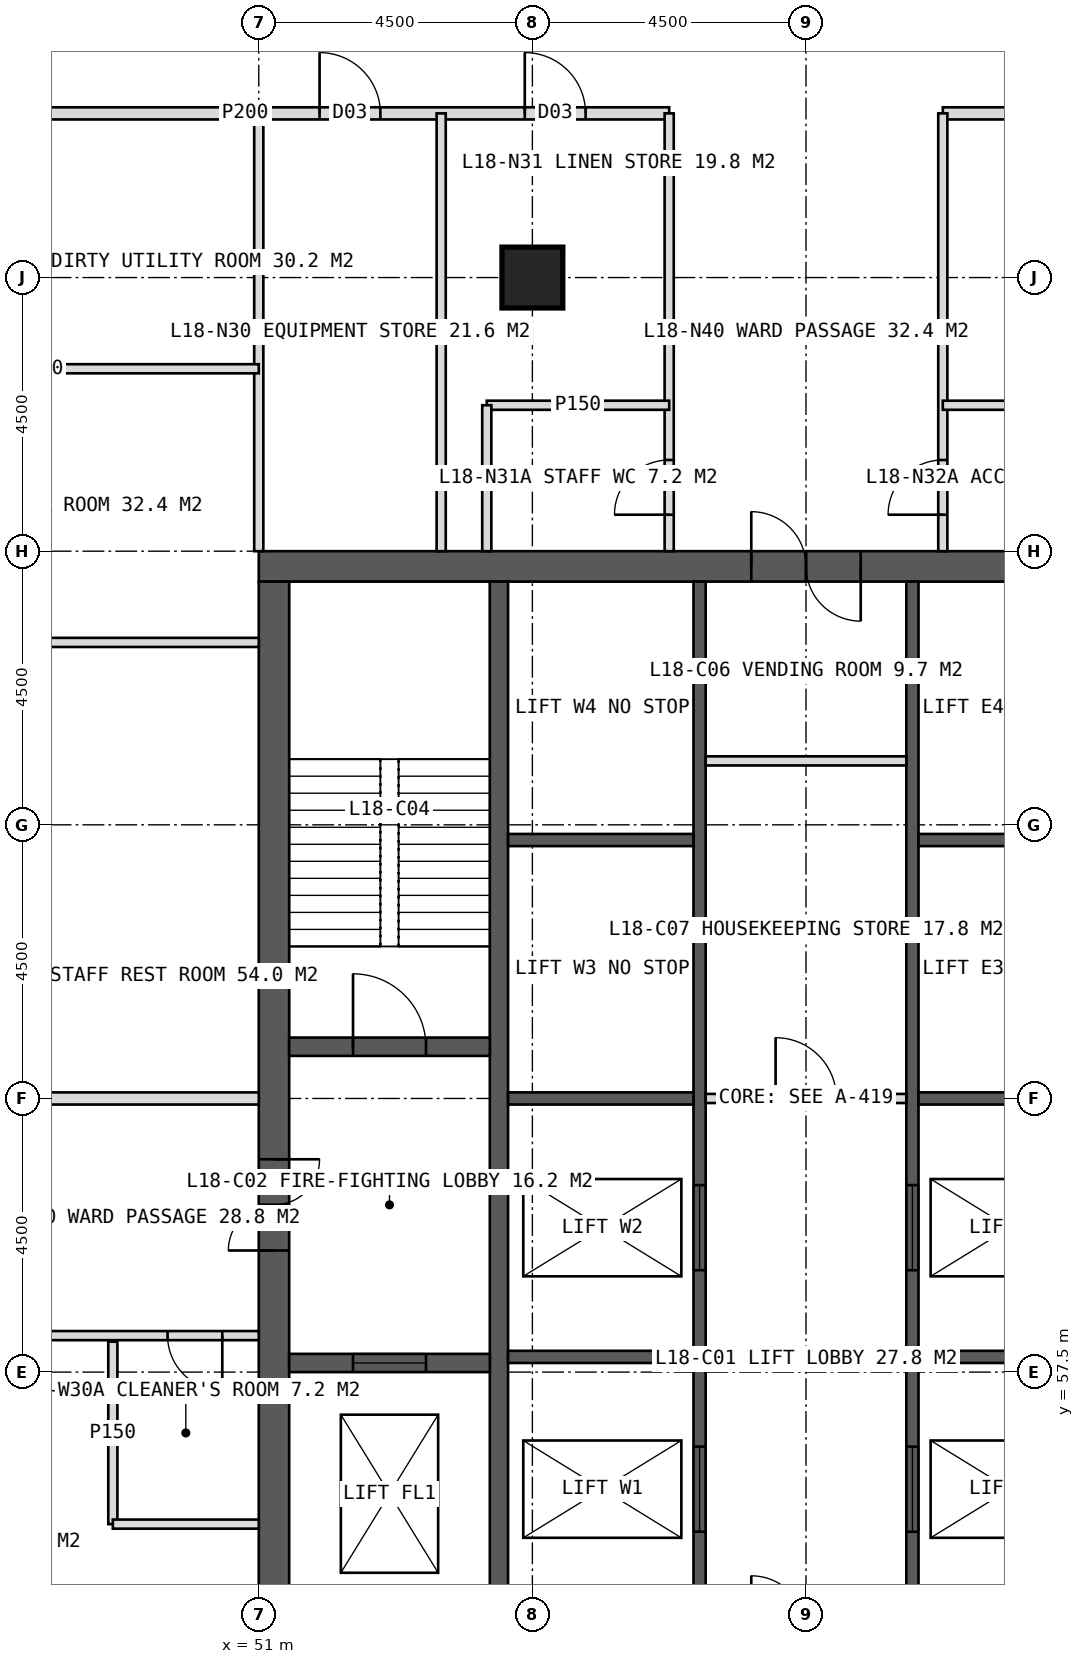
"""IFC4 building model, lengths in metres.
Left out: names, types, materials, properties, quantities, classifications, styles, units other than length and angle.
Written with IfcOpenShell. Run it as: python <this file> out.ifc"""

import sys

from ifc_helpers import new_model, si_unit, direction, frame, frame_2d, origin, origin_2d, place, context, subcontext, project, spatial, rectangle, hollow_rectangle, extrude, element, fill, save


model = new_model("IFC4")
c1 = context("Model", 3, precision=1e-05, world=origin(), true_north=direction((0.0, 1.0)))
c2 = subcontext(c1, "Body", "Model", "MODEL_VIEW")
j1 = project(units=[si_unit("LENGTHUNIT", "METRE"), si_unit("PLANEANGLEUNIT", "RADIAN")], contexts=[c1])
p1 = place(None, origin())
s1 = spatial("IfcSite", under=j1, at=p1, CompositionType="ELEMENT")
p2 = place(p1, origin())
s2 = spatial("IfcBuilding", under=s1, at=p2, CompositionType="ELEMENT")
p3 = place(p2, frame((0.0, 0.0, 79.0)))
s3 = spatial("IfcBuildingStorey", under=s2, at=p3, CompositionType="ELEMENT", Elevation=79.0)
p4 = place(p3, frame((51.0, 70.75, 0.0), z_axis=(0.0, 0.0, 1.0), x_axis=(1.0, 0.0, 0.0)))
e1 = element("IfcWall", 1, at=p4, inside=s3, PredefinedType="SHEAR", context=c2, shape_type="SweptSolid", body=[
    extrude(rectangle(XDim=18.0, YDim=0.5, at=frame_2d((9.0, 0.0))), origin(), (0.0, 0.0, 1.0), 4.0),
])
p5 = place(p4, frame((8.1, 0.0, 0.0)))
e2 = element("IfcOpeningElement", 2, at=p5, cuts=e1, PredefinedType="OPENING", context=c2, shape_type="SweptSolid", body=[
    extrude(rectangle(XDim=1.8, YDim=2.2, at=frame_2d((0.9, 1.1))), frame((0.0, 0.26, 0.0), z_axis=(0.0, -1.0, 0.0), x_axis=(1.0, 0.0, 0.0)), (0.0, 0.0, 1.0), 0.52),
])
p6 = place(p3, frame((51.25, 53.5, 0.0), z_axis=(0.0, 0.0, 1.0), x_axis=(0.0, 1.0, 0.0)))
e3 = element("IfcWall", 3, at=p6, inside=s3, PredefinedType="SHEAR", context=c2, shape_type="SweptSolid", body=[
    extrude(rectangle(XDim=17.0, YDim=0.5, at=frame_2d((8.5, 0.0))), origin(), (0.0, 0.0, 1.0), 4.0),
])
p7 = place(p6, frame((6.0, 0.0, 0.0)))
e4 = element("IfcOpeningElement", 4, at=p7, cuts=e3, PredefinedType="OPENING", context=c2, shape_type="SweptSolid", body=[
    extrude(rectangle(XDim=1.5, YDim=2.2, at=frame_2d((0.75, 1.1))), frame((0.0, 0.26, 0.0), z_axis=(0.0, -1.0, 0.0), x_axis=(1.0, 0.0, 0.0)), (0.0, 0.0, 1.0), 0.52),
])
p8 = place(p3, frame((54.95, 53.5, 0.0), z_axis=(0.0, 0.0, 1.0), x_axis=(0.0, 1.0, 0.0)))
e5 = element("IfcWall", 5, at=p8, inside=s3, PredefinedType="SHEAR", context=c2, shape_type="SweptSolid", body=[
    extrude(rectangle(XDim=17.0, YDim=0.3, at=frame_2d((8.5, 0.0))), origin(), (0.0, 0.0, 1.0), 4.0),
])
p9 = place(p3, frame((58.25, 53.5, 0.0), z_axis=(0.0, 0.0, 1.0), x_axis=(0.0, 1.0, 0.0)))
e6 = element("IfcWall", 6, at=p9, inside=s3, PredefinedType="SHEAR", context=c2, shape_type="SweptSolid", body=[
    extrude(rectangle(XDim=17.0, YDim=0.2, at=frame_2d((8.5, 0.0))), origin(), (0.0, 0.0, 1.0), 4.0),
])
p10 = place(p9, frame((1.375, 0.0, 0.0)))
e7 = element("IfcOpeningElement", 7, at=p10, cuts=e6, PredefinedType="OPENING", context=c2, shape_type="SweptSolid", body=[
    extrude(rectangle(XDim=1.4, YDim=2.2, at=frame_2d((0.7, 1.1))), frame((0.0, 0.11, 0.0), z_axis=(0.0, -1.0, 0.0), x_axis=(1.0, 0.0, 0.0)), (0.0, 0.0, 1.0), 0.22),
])
p11 = place(p9, frame((5.675, 0.0, 0.0)))
e8 = element("IfcOpeningElement", 8, at=p11, cuts=e6, PredefinedType="OPENING", context=c2, shape_type="SweptSolid", body=[
    extrude(rectangle(XDim=1.4, YDim=2.2, at=frame_2d((0.7, 1.1))), frame((0.0, 0.11, 0.0), z_axis=(0.0, -1.0, 0.0), x_axis=(1.0, 0.0, 0.0)), (0.0, 0.0, 1.0), 0.22),
])
p12 = place(p3, frame((61.75, 53.5, 0.0), z_axis=(0.0, 0.0, 1.0), x_axis=(0.0, 1.0, 0.0)))
e9 = element("IfcWall", 9, at=p12, inside=s3, PredefinedType="SHEAR", context=c2, shape_type="SweptSolid", body=[
    extrude(rectangle(XDim=17.0, YDim=0.2, at=frame_2d((8.5, 0.0))), origin(), (0.0, 0.0, 1.0), 4.0),
])
p13 = place(p12, frame((1.375, 0.0, 0.0)))
e10 = element("IfcOpeningElement", 10, at=p13, cuts=e9, PredefinedType="OPENING", context=c2, shape_type="SweptSolid", body=[
    extrude(rectangle(XDim=1.4, YDim=2.2, at=frame_2d((0.7, 1.1))), frame((0.0, 0.11, 0.0), z_axis=(0.0, -1.0, 0.0), x_axis=(1.0, 0.0, 0.0)), (0.0, 0.0, 1.0), 0.22),
])
p14 = place(p12, frame((5.675, 0.0, 0.0)))
e11 = element("IfcOpeningElement", 11, at=p14, cuts=e9, PredefinedType="OPENING", context=c2, shape_type="SweptSolid", body=[
    extrude(rectangle(XDim=1.4, YDim=2.2, at=frame_2d((0.7, 1.1))), frame((0.0, 0.11, 0.0), z_axis=(0.0, -1.0, 0.0), x_axis=(1.0, 0.0, 0.0)), (0.0, 0.0, 1.0), 0.22),
])
for number, where, z_axis, x_axis in (
    (12, (55.1, 57.75, 0.0), (0.0, 0.0, 1.0), (1.0, 0.0, 0.0)),
    (13, (61.85, 57.75, 0.0), (0.0, 0.0, 1.0), (1.0, 0.0, 0.0)),
    (14, (55.1, 62.0, 0.0), (0.0, 0.0, 1.0), (1.0, 0.0, 0.0)),
    (15, (61.85, 62.0, 0.0), (0.0, 0.0, 1.0), (1.0, 0.0, 0.0)),
    (16, (55.1, 66.25, 0.0), (0.0, 0.0, 1.0), (1.0, 0.0, 0.0)),
    (17, (61.85, 66.25, 0.0), (0.0, 0.0, 1.0), (1.0, 0.0, 0.0)),
):
    element("IfcWall", number, at=place(p3, frame(where, z_axis=z_axis, x_axis=x_axis)), inside=s3, PredefinedType="SHEAR", context=c2, shape_type="SweptSolid", body=[
        extrude(rectangle(XDim=3.05, YDim=0.2, at=frame_2d((1.525, 0.0))), origin(), (0.0, 0.0, 1.0), 4.0),
    ])
p15 = place(p3, frame((51.5, 62.85, 0.0), z_axis=(0.0, 0.0, 1.0), x_axis=(1.0, 0.0, 0.0)))
e18 = element("IfcWall", 18, at=p15, inside=s3, PredefinedType="SHEAR", context=c2, shape_type="SweptSolid", body=[
    extrude(rectangle(XDim=3.3, YDim=0.3, at=frame_2d((1.65, 0.0))), origin(), (0.0, 0.0, 1.0), 4.0),
])
p16 = place(p15, frame((1.05, 0.0, 0.0)))
e19 = element("IfcOpeningElement", 19, at=p16, cuts=e18, PredefinedType="OPENING", context=c2, shape_type="SweptSolid", body=[
    extrude(rectangle(XDim=1.2, YDim=2.1, at=frame_2d((0.6, 1.05))), frame((0.0, 0.16, 0.0), z_axis=(0.0, -1.0, 0.0), x_axis=(1.0, 0.0, 0.0)), (0.0, 0.0, 1.0), 0.32),
])
p17 = place(p3, frame((51.5, 57.65, 0.0), z_axis=(0.0, 0.0, 1.0), x_axis=(1.0, 0.0, 0.0)))
e20 = element("IfcWall", 20, at=p17, inside=s3, PredefinedType="SHEAR", context=c2, shape_type="SweptSolid", body=[
    extrude(rectangle(XDim=3.3, YDim=0.3, at=frame_2d((1.65, 0.0))), origin(), (0.0, 0.0, 1.0), 4.0),
])
p18 = place(p17, frame((1.05, 0.0, 0.0)))
e21 = element("IfcOpeningElement", 21, at=p18, cuts=e20, PredefinedType="OPENING", context=c2, shape_type="SweptSolid", body=[
    extrude(rectangle(XDim=1.2, YDim=2.2, at=frame_2d((0.6, 1.1))), frame((0.0, 0.16, 0.0), z_axis=(0.0, -1.0, 0.0), x_axis=(1.0, 0.0, 0.0)), (0.0, 0.0, 1.0), 0.32),
])
p19 = place(p3, frame((55.5, 75.5, 0.0), z_axis=(0.0, 0.0, 1.0), x_axis=(1.0, 0.0, 0.0)))
e22 = element("IfcColumn", 22, at=p19, inside=s3, PredefinedType="COLUMN", context=c2, shape_type="SweptSolid", body=[
    extrude(hollow_rectangle(XDim=1.0, YDim=1.0, WallThickness=0.1, at=origin_2d()), origin(), (0.0, 0.0, 1.0), 4.0),
])
p20 = place(p3, frame((51.0, 71.0, 0.0), z_axis=(0.0, 0.0, 1.0), x_axis=(0.0, 1.0, 0.0)))
e23 = element("IfcWall", 23, at=p20, inside=s3, PredefinedType="PARTITIONING", context=c2, shape_type="SweptSolid", body=[
    extrude(rectangle(XDim=7.2, YDim=0.15, at=frame_2d((3.6, 0.0))), origin(), (0.0, 0.0, 1.0), 3.75),
])
p21 = place(p3, frame((43.8, 78.2, 0.0), z_axis=(0.0, 0.0, 1.0), x_axis=(1.0, 0.0, 0.0)))
e24 = element("IfcWall", 24, at=p21, inside=s3, PredefinedType="PARTITIONING", context=c2, shape_type="SweptSolid", body=[
    extrude(rectangle(XDim=13.95, YDim=0.2, at=frame_2d((6.975, 0.0))), origin(), (0.0, 0.0, 1.0), 3.75),
])
p22 = place(p21, frame((8.2, 0.0, 0.0)))
e25 = element("IfcOpeningElement", 25, at=p22, cuts=e24, PredefinedType="OPENING", context=c2, shape_type="SweptSolid", body=[
    extrude(rectangle(XDim=1.0, YDim=2.1, at=frame_2d((0.5, 1.05))), frame((0.0, 0.11, 0.0), z_axis=(0.0, -1.0, 0.0), x_axis=(1.0, 0.0, 0.0)), (0.0, 0.0, 1.0), 0.22),
])
p23 = place(p21, frame((11.575, 0.0, 0.0)))
e26 = element("IfcOpeningElement", 26, at=p23, cuts=e24, PredefinedType="OPENING", context=c2, shape_type="SweptSolid", body=[
    extrude(rectangle(XDim=1.0, YDim=2.1, at=frame_2d((0.5, 1.05))), frame((0.0, 0.11, 0.0), z_axis=(0.0, -1.0, 0.0), x_axis=(1.0, 0.0, 0.0)), (0.0, 0.0, 1.0), 0.22),
])
p24 = place(p3, frame((62.25, 78.2, 0.0), z_axis=(0.0, 0.0, 1.0), x_axis=(1.0, 0.0, 0.0)))
e27 = element("IfcWall", 27, at=p24, inside=s3, PredefinedType="PARTITIONING", context=c2, shape_type="SweptSolid", body=[
    extrude(rectangle(XDim=6.75, YDim=0.2, at=frame_2d((3.375, 0.0))), origin(), (0.0, 0.0, 1.0), 3.75),
])
p25 = place(p24, frame((2.125, 0.0, 0.0)))
e28 = element("IfcOpeningElement", 28, at=p25, cuts=e27, PredefinedType="OPENING", context=c2, shape_type="SweptSolid", body=[
    extrude(rectangle(XDim=1.0, YDim=2.1, at=frame_2d((0.5, 1.05))), frame((0.0, 0.11, 0.0), z_axis=(0.0, -1.0, 0.0), x_axis=(1.0, 0.0, 0.0)), (0.0, 0.0, 1.0), 0.22),
])
p26 = place(p24, frame((5.5, 0.0, 0.0)))
e29 = element("IfcOpeningElement", 29, at=p26, cuts=e27, PredefinedType="OPENING", context=c2, shape_type="SweptSolid", body=[
    extrude(rectangle(XDim=1.0, YDim=2.1, at=frame_2d((0.5, 1.05))), frame((0.0, 0.11, 0.0), z_axis=(0.0, -1.0, 0.0), x_axis=(1.0, 0.0, 0.0)), (0.0, 0.0, 1.0), 0.22),
])
p27 = place(p3, frame((57.75, 71.0, 0.0), z_axis=(0.0, 0.0, 1.0), x_axis=(0.0, 1.0, 0.0)))
e30 = element("IfcWall", 30, at=p27, inside=s3, PredefinedType="PARTITIONING", context=c2, shape_type="SweptSolid", body=[
    extrude(rectangle(XDim=7.2, YDim=0.15, at=frame_2d((3.6, 0.0))), origin(), (0.0, 0.0, 1.0), 3.75),
])
p28 = place(p27, frame((0.6, 0.0, 0.0)))
e31 = element("IfcOpeningElement", 31, at=p28, cuts=e30, PredefinedType="OPENING", context=c2, shape_type="SweptSolid", body=[
    extrude(rectangle(XDim=0.9, YDim=2.1, at=frame_2d((0.45, 1.05))), frame((0.0, 0.085, 0.0), z_axis=(0.0, -1.0, 0.0), x_axis=(1.0, 0.0, 0.0)), (0.0, 0.0, 1.0), 0.17),
])
p29 = place(p3, frame((62.25, 71.0, 0.0), z_axis=(0.0, 0.0, 1.0), x_axis=(0.0, 1.0, 0.0)))
e32 = element("IfcWall", 32, at=p29, inside=s3, PredefinedType="PARTITIONING", context=c2, shape_type="SweptSolid", body=[
    extrude(rectangle(XDim=7.2, YDim=0.15, at=frame_2d((3.6, 0.0))), origin(), (0.0, 0.0, 1.0), 3.75),
])
p30 = place(p29, frame((0.6, 0.0, 0.0)))
e33 = element("IfcOpeningElement", 33, at=p30, cuts=e32, PredefinedType="OPENING", context=c2, shape_type="SweptSolid", body=[
    extrude(rectangle(XDim=0.9, YDim=2.1, at=frame_2d((0.45, 1.05))), frame((0.0, 0.085, 0.0), z_axis=(0.0, -1.0, 0.0), x_axis=(1.0, 0.0, 0.0)), (0.0, 0.0, 1.0), 0.17),
])
p31 = place(p3, frame((54.0, 71.0, 0.0), z_axis=(0.0, 0.0, 1.0), x_axis=(0.0, 1.0, 0.0)))
e34 = element("IfcWall", 34, at=p31, inside=s3, PredefinedType="PARTITIONING", context=c2, shape_type="SweptSolid", body=[
    extrude(rectangle(XDim=7.2, YDim=0.15, at=frame_2d((3.6, 0.0))), origin(), (0.0, 0.0, 1.0), 3.75),
])
p32 = place(p3, frame((54.75, 73.4, 0.0), z_axis=(0.0, 0.0, 1.0), x_axis=(1.0, 0.0, 0.0)))
e35 = element("IfcWall", 35, at=p32, inside=s3, PredefinedType="PARTITIONING", context=c2, shape_type="SweptSolid", body=[
    extrude(rectangle(XDim=3.0, YDim=0.15, at=frame_2d((1.5, 0.0))), origin(), (0.0, 0.0, 1.0), 3.75),
])
p33 = place(p3, frame((54.75, 71.0, 0.0), z_axis=(0.0, 0.0, 1.0), x_axis=(0.0, 1.0, 0.0)))
e36 = element("IfcWall", 36, at=p33, inside=s3, PredefinedType="PARTITIONING", context=c2, shape_type="SweptSolid", body=[
    extrude(rectangle(XDim=2.4, YDim=0.15, at=frame_2d((1.2, 0.0))), origin(), (0.0, 0.0, 1.0), 3.75),
])
p34 = place(p3, frame((62.25, 73.4, 0.0), z_axis=(0.0, 0.0, 1.0), x_axis=(1.0, 0.0, 0.0)))
e37 = element("IfcWall", 37, at=p34, inside=s3, PredefinedType="PARTITIONING", context=c2, shape_type="SweptSolid", body=[
    extrude(rectangle(XDim=3.0, YDim=0.15, at=frame_2d((1.5, 0.0))), origin(), (0.0, 0.0, 1.0), 3.75),
])
p35 = place(p3, frame((51.0, 58.1, 0.0), z_axis=(0.0, 0.0, 1.0), x_axis=(-1.0, 0.0, 0.0)))
e38 = element("IfcWall", 38, at=p35, inside=s3, PredefinedType="PARTITIONING", context=c2, shape_type="SweptSolid", body=[
    extrude(rectangle(XDim=7.2, YDim=0.15, at=frame_2d((3.6, 0.0))), origin(), (0.0, 0.0, 1.0), 3.75),
])
p36 = place(p35, frame((0.6, 0.0, 0.0)))
e39 = element("IfcOpeningElement", 39, at=p36, cuts=e38, PredefinedType="OPENING", context=c2, shape_type="SweptSolid", body=[
    extrude(rectangle(XDim=0.9, YDim=2.1, at=frame_2d((0.45, 1.05))), frame((0.0, 0.085, 0.0), z_axis=(0.0, -1.0, 0.0), x_axis=(1.0, 0.0, 0.0)), (0.0, 0.0, 1.0), 0.17),
])
p37 = place(p3, frame((51.0, 62.0, 0.0), z_axis=(0.0, 0.0, 1.0), x_axis=(-1.0, 0.0, 0.0)))
e40 = element("IfcWall", 40, at=p37, inside=s3, PredefinedType="SOLIDWALL", context=c2, shape_type="SweptSolid", body=[
    extrude(rectangle(XDim=7.2, YDim=0.2, at=frame_2d((3.6, 0.0))), origin(), (0.0, 0.0, 1.0), 2.75),
])
for number, where, z_axis, x_axis in (
    (41, (51.0, 69.5, 0.0), (0.0, 0.0, 1.0), (-1.0, 0.0, 0.0)),
    (42, (51.0, 74.0, 0.0), (0.0, 0.0, 1.0), (-1.0, 0.0, 0.0)),
):
    element("IfcWall", number, at=place(p3, frame(where, z_axis=z_axis, x_axis=x_axis)), inside=s3, PredefinedType="PARTITIONING", context=c2, shape_type="SweptSolid", body=[
        extrude(rectangle(XDim=7.2, YDim=0.15, at=frame_2d((3.6, 0.0))), origin(), (0.0, 0.0, 1.0), 3.75),
    ])
p38 = place(p3, frame((48.6, 55.0, 0.0), z_axis=(0.0, 0.0, 1.0), x_axis=(0.0, 1.0, 0.0)))
e43 = element("IfcWall", 43, at=p38, inside=s3, PredefinedType="PARTITIONING", context=c2, shape_type="SweptSolid", body=[
    extrude(rectangle(XDim=3.0, YDim=0.15, at=frame_2d((1.5, 0.0))), origin(), (0.0, 0.0, 1.0), 3.75),
])
p39 = place(p3, frame((51.0, 55.0, 0.0), z_axis=(0.0, 0.0, 1.0), x_axis=(-1.0, 0.0, 0.0)))
e44 = element("IfcWall", 44, at=p39, inside=s3, PredefinedType="PARTITIONING", context=c2, shape_type="SweptSolid", body=[
    extrude(rectangle(XDim=2.4, YDim=0.15, at=frame_2d((1.2, 0.0))), origin(), (0.0, 0.0, 1.0), 3.75),
])
p40 = place(p3, frame((58.35, 62.0, 0.0), z_axis=(0.0, 0.0, 1.0), x_axis=(1.0, 0.0, 0.0)))
e45 = element("IfcWall", 45, at=p40, inside=s3, PredefinedType="PARTITIONING", context=c2, shape_type="SweptSolid", body=[
    extrude(rectangle(XDim=3.3, YDim=0.15, at=frame_2d((1.65, 0.0))), origin(), (0.0, 0.0, 1.0), 3.75),
])
p41 = place(p40, frame((1.15, 0.0, 0.0)))
e46 = element("IfcOpeningElement", 46, at=p41, cuts=e45, PredefinedType="OPENING", context=c2, shape_type="SweptSolid", body=[
    extrude(rectangle(XDim=1.0, YDim=2.1, at=frame_2d((0.5, 1.05))), frame((0.0, 0.085, 0.0), z_axis=(0.0, -1.0, 0.0), x_axis=(1.0, 0.0, 0.0)), (0.0, 0.0, 1.0), 0.17),
])
p42 = place(p3, frame((58.35, 67.551, 0.0), z_axis=(0.0, 0.0, 1.0), x_axis=(1.0, 0.0, 0.0)))
e47 = element("IfcWall", 47, at=p42, inside=s3, PredefinedType="PARTITIONING", context=c2, shape_type="SweptSolid", body=[
    extrude(rectangle(XDim=3.3, YDim=0.15, at=frame_2d((1.65, 0.0))), origin(), (0.0, 0.0, 1.0), 3.75),
])
p43 = place(p22, origin())
e48 = element("IfcDoor", 48, at=p43, inside=s3, OperationType="SINGLE_SWING_LEFT", PredefinedType="DOOR", context=c2, shape_type="SweptSolid", body=[
    extrude(rectangle(XDim=1.0, YDim=2.1, at=frame_2d((0.5, 1.05))), frame((0.0, 0.025, 0.0), z_axis=(0.0, -1.0, 0.0), x_axis=(1.0, 0.0, 0.0)), (0.0, 0.0, 1.0), 0.05),
])
fill(e25, e48)
p44 = place(p28, origin())
e49 = element("IfcDoor", 49, at=p44, inside=s3, OperationType="SINGLE_SWING_LEFT", PredefinedType="DOOR", context=c2, shape_type="SweptSolid", body=[
    extrude(rectangle(XDim=0.9, YDim=2.1, at=frame_2d((0.45, 1.05))), frame((0.0, 0.025, 0.0), z_axis=(0.0, -1.0, 0.0), x_axis=(1.0, 0.0, 0.0)), (0.0, 0.0, 1.0), 0.05),
])
fill(e31, e49)
p45 = place(p23, origin())
e50 = element("IfcDoor", 50, at=p45, inside=s3, OperationType="SINGLE_SWING_LEFT", PredefinedType="DOOR", context=c2, shape_type="SweptSolid", body=[
    extrude(rectangle(XDim=1.0, YDim=2.1, at=frame_2d((0.5, 1.05))), frame((0.0, 0.025, 0.0), z_axis=(0.0, -1.0, 0.0), x_axis=(1.0, 0.0, 0.0)), (0.0, 0.0, 1.0), 0.05),
])
fill(e26, e50)
p46 = place(p30, origin())
e51 = element("IfcDoor", 51, at=p46, inside=s3, OperationType="SINGLE_SWING_LEFT", PredefinedType="DOOR", context=c2, shape_type="SweptSolid", body=[
    extrude(rectangle(XDim=0.9, YDim=2.1, at=frame_2d((0.45, 1.05))), frame((0.0, 0.025, 0.0), z_axis=(0.0, -1.0, 0.0), x_axis=(1.0, 0.0, 0.0)), (0.0, 0.0, 1.0), 0.05),
])
fill(e33, e51)
p47 = place(p36, origin())
e52 = element("IfcDoor", 52, at=p47, inside=s3, OperationType="SINGLE_SWING_LEFT", PredefinedType="DOOR", context=c2, shape_type="SweptSolid", body=[
    extrude(rectangle(XDim=0.9, YDim=2.1, at=frame_2d((0.45, 1.05))), frame((0.0, 0.025, 0.0), z_axis=(0.0, -1.0, 0.0), x_axis=(1.0, 0.0, 0.0)), (0.0, 0.0, 1.0), 0.05),
])
fill(e39, e52)
p48 = place(p7, origin())
e53 = element("IfcDoor", 53, at=p48, inside=s3, OperationType="DOUBLE_DOOR_SINGLE_SWING", PredefinedType="DOOR", context=c2, shape_type="SweptSolid", body=[
    extrude(rectangle(XDim=1.5, YDim=2.2, at=frame_2d((0.75, 1.1))), frame((0.0, 0.025, 0.0), z_axis=(0.0, -1.0, 0.0), x_axis=(1.0, 0.0, 0.0)), (0.0, 0.0, 1.0), 0.05),
])
fill(e4, e53)
p49 = place(p16, origin())
e54 = element("IfcDoor", 54, at=p49, inside=s3, OperationType="SINGLE_SWING_LEFT", PredefinedType="DOOR", context=c2, shape_type="SweptSolid", body=[
    extrude(rectangle(XDim=1.2, YDim=2.1, at=frame_2d((0.6, 1.05))), frame((0.0, 0.025, 0.0), z_axis=(0.0, -1.0, 0.0), x_axis=(1.0, 0.0, 0.0)), (0.0, 0.0, 1.0), 0.05),
])
fill(e19, e54)
p50 = place(p18, origin())
e55 = element("IfcDoor", 55, at=p50, inside=s3, OperationType="SLIDING_TO_LEFT", PredefinedType="DOOR", context=c2, shape_type="SweptSolid", body=[
    extrude(rectangle(XDim=1.2, YDim=2.2, at=frame_2d((0.6, 1.1))), frame((0.0, 0.025, 0.0), z_axis=(0.0, -1.0, 0.0), x_axis=(1.0, 0.0, 0.0)), (0.0, 0.0, 1.0), 0.05),
])
fill(e21, e55)
p51 = place(p10, origin())
e56 = element("IfcDoor", 56, at=p51, inside=s3, OperationType="SLIDING_TO_LEFT", PredefinedType="DOOR", context=c2, shape_type="SweptSolid", body=[
    extrude(rectangle(XDim=1.4, YDim=2.2, at=frame_2d((0.7, 1.1))), frame((0.0, 0.025, 0.0), z_axis=(0.0, -1.0, 0.0), x_axis=(1.0, 0.0, 0.0)), (0.0, 0.0, 1.0), 0.05),
])
fill(e7, e56)
p52 = place(p13, origin())
e57 = element("IfcDoor", 57, at=p52, inside=s3, OperationType="SLIDING_TO_LEFT", PredefinedType="DOOR", context=c2, shape_type="SweptSolid", body=[
    extrude(rectangle(XDim=1.4, YDim=2.2, at=frame_2d((0.7, 1.1))), frame((0.0, 0.025, 0.0), z_axis=(0.0, -1.0, 0.0), x_axis=(1.0, 0.0, 0.0)), (0.0, 0.0, 1.0), 0.05),
])
fill(e10, e57)
p53 = place(p11, origin())
e58 = element("IfcDoor", 58, at=p53, inside=s3, OperationType="SLIDING_TO_LEFT", PredefinedType="DOOR", context=c2, shape_type="SweptSolid", body=[
    extrude(rectangle(XDim=1.4, YDim=2.2, at=frame_2d((0.7, 1.1))), frame((0.0, 0.025, 0.0), z_axis=(0.0, -1.0, 0.0), x_axis=(1.0, 0.0, 0.0)), (0.0, 0.0, 1.0), 0.05),
])
fill(e8, e58)
p54 = place(p14, origin())
e59 = element("IfcDoor", 59, at=p54, inside=s3, OperationType="SLIDING_TO_LEFT", PredefinedType="DOOR", context=c2, shape_type="SweptSolid", body=[
    extrude(rectangle(XDim=1.4, YDim=2.2, at=frame_2d((0.7, 1.1))), frame((0.0, 0.025, 0.0), z_axis=(0.0, -1.0, 0.0), x_axis=(1.0, 0.0, 0.0)), (0.0, 0.0, 1.0), 0.05),
])
fill(e11, e59)
p55 = place(p41, origin())
e60 = element("IfcDoor", 60, at=p55, inside=s3, OperationType="SINGLE_SWING_LEFT", PredefinedType="DOOR", context=c2, shape_type="SweptSolid", body=[
    extrude(rectangle(XDim=1.0, YDim=2.1, at=frame_2d((0.5, 1.05))), frame((0.0, 0.025, 0.0), z_axis=(0.0, -1.0, 0.0), x_axis=(1.0, 0.0, 0.0)), (0.0, 0.0, 1.0), 0.05),
])
fill(e46, e60)
p56 = place(p5, origin())
e61 = element("IfcDoor", 61, at=p56, inside=s3, OperationType="DOUBLE_DOOR_SINGLE_SWING", PredefinedType="DOOR", context=c2, shape_type="SweptSolid", body=[
    extrude(rectangle(XDim=1.8, YDim=2.2, at=frame_2d((0.9, 1.1))), frame((0.0, 0.025, 0.0), z_axis=(0.0, -1.0, 0.0), x_axis=(1.0, 0.0, 0.0)), (0.0, 0.0, 1.0), 0.05),
])
fill(e2, e61)
save(model, sys.argv[1])
